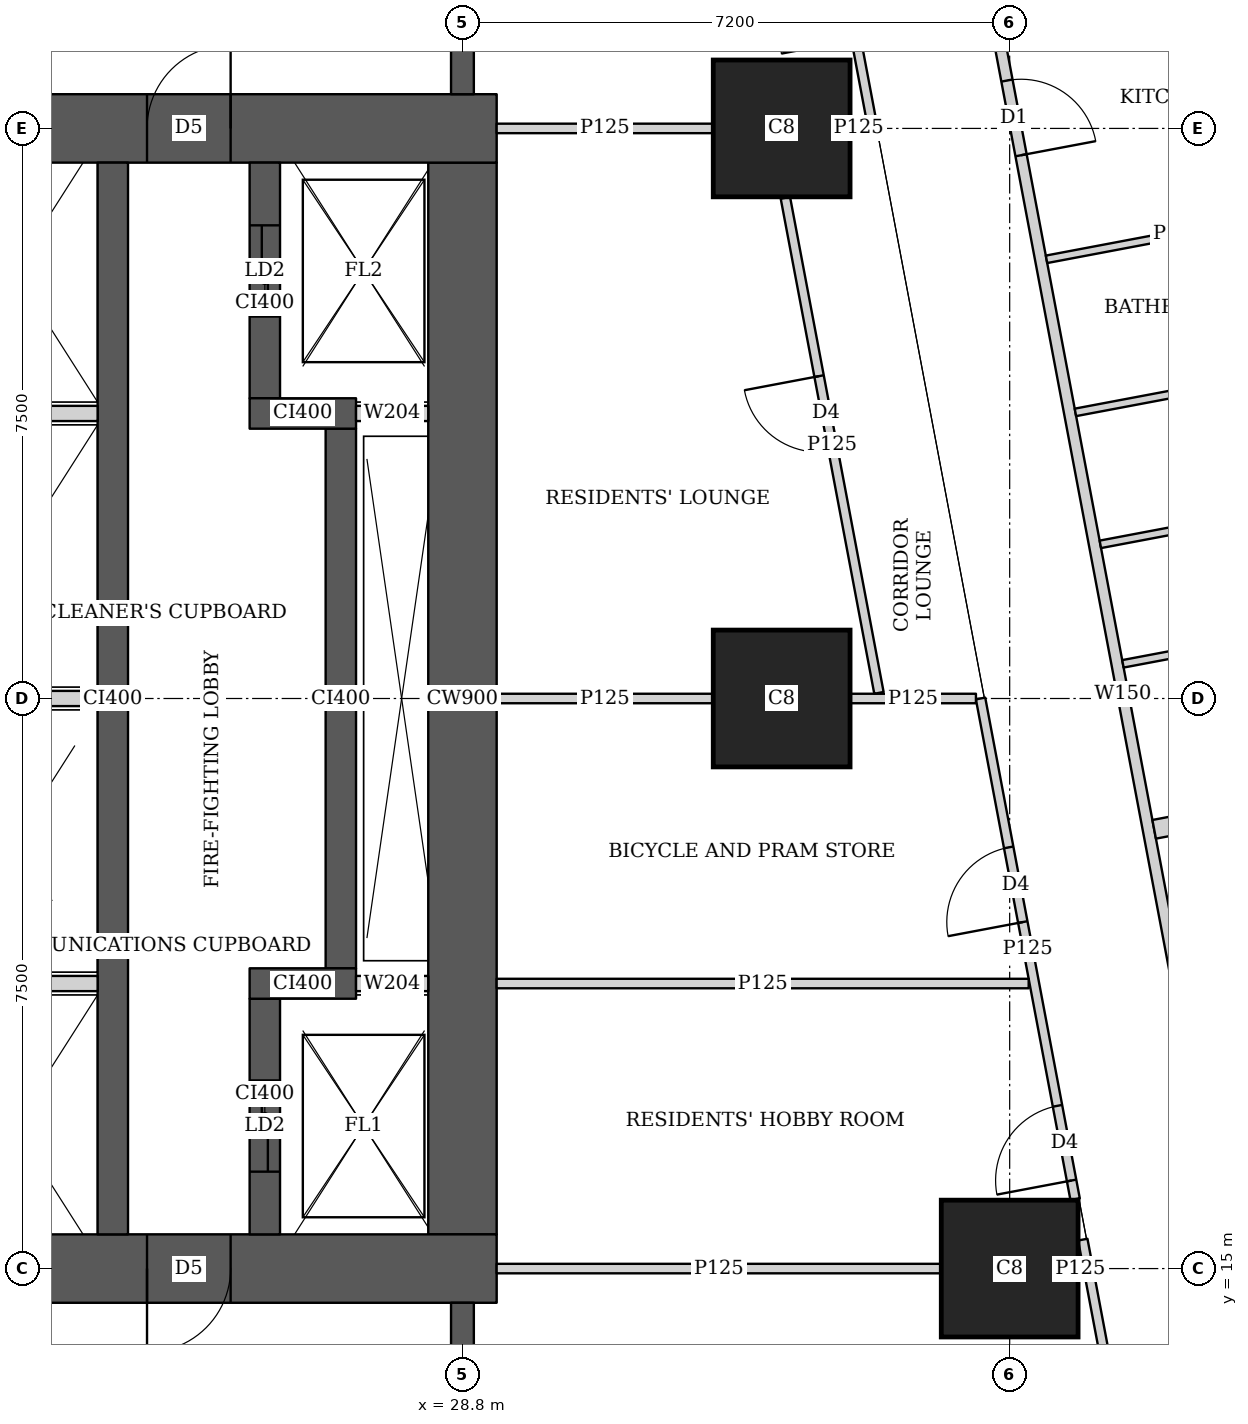
"""IFC4 building model, lengths in metres.
Left out: names, types, materials, properties, quantities, classifications, styles, units other than length and angle.
Written with IfcOpenShell. Run it as: python <this file> out.ifc"""

import sys

from ifc_helpers import new_model, si_unit, direction, frame, frame_2d, origin, origin_2d, place, context, subcontext, project, spatial, rectangle, extrude, element, fill, save


model = new_model("IFC4")
c1 = context("Model", 3, precision=1e-05, world=origin(), true_north=direction((0.0, 1.0)))
c2 = subcontext(c1, "Body", "Model", "MODEL_VIEW")
j1 = project(units=[si_unit("LENGTHUNIT", "METRE"), si_unit("PLANEANGLEUNIT", "RADIAN")], contexts=[c1])
p1 = place(None, origin())
s1 = spatial("IfcSite", under=j1, at=p1, CompositionType="ELEMENT")
p2 = place(p1, origin())
s2 = spatial("IfcBuilding", under=s1, at=p2, CompositionType="ELEMENT")
p3 = place(p2, frame((0.0, 0.0, 23.75)))
s3 = spatial("IfcBuildingStorey", under=s2, at=p3, CompositionType="ELEMENT", Elevation=23.75)
for number, where, z_axis, x_axis in (
    (1, (36.0, 15.0, 0.0), (0.0, 0.0, 1.0), (1.0, 0.0, 0.0)),
    (2, (33.0, 22.5, 0.0), (0.0, 0.0, 1.0), (1.0, 0.0, 0.0)),
    (3, (33.0, 30.0, 0.0), (0.0, 0.0, 1.0), (1.0, 0.0, 0.0)),
):
    element("IfcColumn", number, at=place(p3, frame(where, z_axis=z_axis, x_axis=x_axis)), inside=s3, PredefinedType="COLUMN", context=c2, shape_type="SweptSolid", body=[
        extrude(rectangle(XDim=1.8, YDim=1.8, at=origin_2d()), origin(), (0.0, 0.0, 1.0), 3.75),
    ])
p4 = place(p3, frame((13.95, 15.0, 0.0), z_axis=(0.0, 0.0, 1.0), x_axis=(1.0, 0.0, 0.0)))
e4 = element("IfcWall", 4, at=p4, inside=s3, PredefinedType="SHEAR", context=c2, shape_type="SweptSolid", body=[
    extrude(rectangle(XDim=15.3, YDim=0.9, at=frame_2d((7.65, 0.0))), origin(), (0.0, 0.0, 1.0), 3.75),
])
p5 = place(p4, frame((4.45, 0.0, 0.0)))
e5 = element("IfcOpeningElement", 5, at=p5, cuts=e4, PredefinedType="OPENING", context=c2, shape_type="SweptSolid", body=[
    extrude(rectangle(XDim=1.8, YDim=2.1, at=frame_2d((0.9, 1.05))), frame((0.0, 0.46, 0.0), z_axis=(0.0, -1.0, 0.0), x_axis=(1.0, 0.0, 0.0)), (0.0, 0.0, 1.0), 0.92),
])
p6 = place(p4, frame((10.7, 0.0, 0.0)))
e6 = element("IfcOpeningElement", 6, at=p6, cuts=e4, PredefinedType="OPENING", context=c2, shape_type="SweptSolid", body=[
    extrude(rectangle(XDim=1.1, YDim=2.1, at=frame_2d((0.55, 1.05))), frame((0.0, 0.46, 0.0), z_axis=(0.0, -1.0, 0.0), x_axis=(1.0, 0.0, 0.0)), (0.0, 0.0, 1.0), 0.92),
])
p7 = place(p3, frame((13.95, 30.0, 0.0), z_axis=(0.0, 0.0, 1.0), x_axis=(1.0, 0.0, 0.0)))
e7 = element("IfcWall", 7, at=p7, inside=s3, PredefinedType="SHEAR", context=c2, shape_type="SweptSolid", body=[
    extrude(rectangle(XDim=15.3, YDim=0.9, at=frame_2d((7.65, 0.0))), origin(), (0.0, 0.0, 1.0), 3.75),
])
p8 = place(p7, frame((4.45, 0.0, 0.0)))
e8 = element("IfcOpeningElement", 8, at=p8, cuts=e7, PredefinedType="OPENING", context=c2, shape_type="SweptSolid", body=[
    extrude(rectangle(XDim=1.8, YDim=2.1, at=frame_2d((0.9, 1.05))), frame((0.0, 0.46, 0.0), z_axis=(0.0, -1.0, 0.0), x_axis=(1.0, 0.0, 0.0)), (0.0, 0.0, 1.0), 0.92),
])
p9 = place(p7, frame((10.7, 0.0, 0.0)))
e9 = element("IfcOpeningElement", 9, at=p9, cuts=e7, PredefinedType="OPENING", context=c2, shape_type="SweptSolid", body=[
    extrude(rectangle(XDim=1.1, YDim=2.1, at=frame_2d((0.55, 1.05))), frame((0.0, 0.46, 0.0), z_axis=(0.0, -1.0, 0.0), x_axis=(1.0, 0.0, 0.0)), (0.0, 0.0, 1.0), 0.92),
])
p10 = place(p3, frame((28.8, 15.45, 0.0), z_axis=(0.0, 0.0, 1.0), x_axis=(0.0, 1.0, 0.0)))
e10 = element("IfcWall", 10, at=p10, inside=s3, PredefinedType="SHEAR", context=c2, shape_type="SweptSolid", body=[
    extrude(rectangle(XDim=14.1, YDim=0.9, at=frame_2d((7.05, 0.0))), origin(), (0.0, 0.0, 1.0), 3.75),
])
p11 = place(p3, frame((24.2, 15.45, 0.0), z_axis=(0.0, 0.0, 1.0), x_axis=(0.0, 1.0, 0.0)))
e11 = element("IfcWall", 11, at=p11, inside=s3, PredefinedType="SHEAR", context=c2, shape_type="SweptSolid", body=[
    extrude(rectangle(XDim=14.1, YDim=0.4, at=frame_2d((7.05, 0.0))), origin(), (0.0, 0.0, 1.0), 3.75),
])
p12 = place(p3, frame((26.2, 15.45, 0.0), z_axis=(0.0, 0.0, 1.0), x_axis=(0.0, 1.0, 0.0)))
e12 = element("IfcWall", 12, at=p12, inside=s3, PredefinedType="SHEAR", context=c2, shape_type="SweptSolid", body=[
    extrude(rectangle(XDim=3.1, YDim=0.4, at=frame_2d((1.55, 0.0))), origin(), (0.0, 0.0, 1.0), 3.75),
])
p13 = place(p12, frame((0.825, 0.0, 0.0)))
e13 = element("IfcOpeningElement", 13, at=p13, cuts=e12, PredefinedType="OPENING", context=c2, shape_type="SweptSolid", body=[
    extrude(rectangle(XDim=1.2, YDim=2.1, at=frame_2d((0.6, 1.05))), frame((0.0, 0.21, 0.0), z_axis=(0.0, -1.0, 0.0), x_axis=(1.0, 0.0, 0.0)), (0.0, 0.0, 1.0), 0.42),
])
p14 = place(p3, frame((26.0, 18.75, 0.0), z_axis=(0.0, 0.0, 1.0), x_axis=(1.0, 0.0, 0.0)))
e14 = element("IfcWall", 14, at=p14, inside=s3, PredefinedType="SHEAR", context=c2, shape_type="SweptSolid", body=[
    extrude(rectangle(XDim=1.4, YDim=0.4, at=frame_2d((0.7, 0.0))), origin(), (0.0, 0.0, 1.0), 3.75),
])
p15 = place(p3, frame((27.2, 18.95, 0.0), z_axis=(0.0, 0.0, 1.0), x_axis=(0.0, 1.0, 0.0)))
e15 = element("IfcWall", 15, at=p15, inside=s3, PredefinedType="SHEAR", context=c2, shape_type="SweptSolid", body=[
    extrude(rectangle(XDim=7.1, YDim=0.4, at=frame_2d((3.55, 0.0))), origin(), (0.0, 0.0, 1.0), 3.75),
])
p16 = place(p3, frame((26.0, 26.25, 0.0), z_axis=(0.0, 0.0, 1.0), x_axis=(1.0, 0.0, 0.0)))
e16 = element("IfcWall", 16, at=p16, inside=s3, PredefinedType="SHEAR", context=c2, shape_type="SweptSolid", body=[
    extrude(rectangle(XDim=1.4, YDim=0.4, at=frame_2d((0.7, 0.0))), origin(), (0.0, 0.0, 1.0), 3.75),
])
p17 = place(p3, frame((26.2, 26.45, 0.0), z_axis=(0.0, 0.0, 1.0), x_axis=(0.0, 1.0, 0.0)))
e17 = element("IfcWall", 17, at=p17, inside=s3, PredefinedType="SHEAR", context=c2, shape_type="SweptSolid", body=[
    extrude(rectangle(XDim=3.1, YDim=0.4, at=frame_2d((1.55, 0.0))), origin(), (0.0, 0.0, 1.0), 3.75),
])
p18 = place(p17, frame((1.075, 0.0, 0.0)))
e18 = element("IfcOpeningElement", 18, at=p18, cuts=e17, PredefinedType="OPENING", context=c2, shape_type="SweptSolid", body=[
    extrude(rectangle(XDim=1.2, YDim=2.1, at=frame_2d((0.6, 1.05))), frame((0.0, 0.21, 0.0), z_axis=(0.0, -1.0, 0.0), x_axis=(1.0, 0.0, 0.0)), (0.0, 0.0, 1.0), 0.42),
])
for number, where, z_axis, x_axis in (
    (19, (28.8, 10.35, 0.0), (0.0, 0.0, 1.0), (0.0, 1.0, 0.0)),
    (20, (28.8, 30.45, 0.0), (0.0, 0.0, 1.0), (0.0, 1.0, 0.0)),
):
    element("IfcWall", number, at=place(p3, frame(where, z_axis=z_axis, x_axis=x_axis)), inside=s3, PredefinedType="SHEAR", context=c2, shape_type="SweptSolid", body=[
        extrude(rectangle(XDim=4.2, YDim=0.3, at=frame_2d((2.1, 0.0))), origin(), (0.0, 0.0, 1.0), 3.75),
    ])
p19 = place(p3, frame((33.755, 42.325, 0.0), z_axis=(0.0, 0.0, 1.0), x_axis=(0.185611461091, -0.982623216453, 0.0)))
e21 = element("IfcWall", 21, at=p19, inside=s3, PredefinedType="SOLIDWALL", context=c2, shape_type="SweptSolid", body=[
    extrude(rectangle(XDim=40.241, YDim=0.15, at=frame_2d((20.121, 0.0))), origin(), (0.0, 0.0, 1.0), 2.5),
])
p20 = place(p19, frame((7.325, 0.0, 0.0)))
e22 = element("IfcOpeningElement", 22, at=p20, cuts=e21, PredefinedType="OPENING", context=c2, shape_type="SweptSolid", body=[
    extrude(rectangle(XDim=1.0, YDim=2.1, at=frame_2d((0.5, 1.05))), frame((0.0, 0.085, 0.0), z_axis=(0.0, -1.0, 0.0), x_axis=(1.0, 0.0, 0.0)), (0.0, 0.0, 1.0), 0.17),
])
p21 = place(p19, frame((11.902, 0.0, 0.0)))
e23 = element("IfcOpeningElement", 23, at=p21, cuts=e21, PredefinedType="OPENING", context=c2, shape_type="SweptSolid", body=[
    extrude(rectangle(XDim=1.0, YDim=2.1, at=frame_2d((0.5, 1.05))), frame((0.0, 0.085, 0.0), z_axis=(0.0, -1.0, 0.0), x_axis=(1.0, 0.0, 0.0)), (0.0, 0.0, 1.0), 0.17),
])
p22 = place(p19, frame((25.718, 0.0, 0.0)))
e24 = element("IfcOpeningElement", 24, at=p22, cuts=e21, PredefinedType="OPENING", context=c2, shape_type="SweptSolid", body=[
    extrude(rectangle(XDim=1.0, YDim=2.1, at=frame_2d((0.5, 1.05))), frame((0.0, 0.085, 0.0), z_axis=(0.0, -1.0, 0.0), x_axis=(1.0, 0.0, 0.0)), (0.0, 0.0, 1.0), 0.17),
])
p23 = place(p19, frame((31.788, 0.0, 0.0)))
e25 = element("IfcOpeningElement", 25, at=p23, cuts=e21, PredefinedType="OPENING", context=c2, shape_type="SweptSolid", body=[
    extrude(rectangle(XDim=1.0, YDim=2.1, at=frame_2d((0.5, 1.05))), frame((0.0, 0.085, 0.0), z_axis=(0.0, -1.0, 0.0), x_axis=(1.0, 0.0, 0.0)), (0.0, 0.0, 1.0), 0.17),
])
for number, where, z_axis, x_axis in (
    (26, (39.948, 28.933, 0.0), (0.0, 0.0, 1.0), (-0.983, -0.186, 0.0)),
    (27, (40.656, 25.183, 0.0), (0.0, 0.0, 1.0), (-0.983, -0.186, 0.0)),
):
    element("IfcWall", number, at=place(p3, frame(where, z_axis=z_axis, x_axis=x_axis)), inside=s3, PredefinedType="PARTITIONING", context=c2, shape_type="SweptSolid", body=[
        extrude(rectangle(XDim=3.524, YDim=0.1, at=frame_2d((1.762, 0.0))), origin(), (0.0, 0.0, 1.0), 3.5),
    ])
p24 = place(p3, frame((40.329, 26.918, 0.0), z_axis=(0.0, 0.0, 1.0), x_axis=(-0.982638553676, -0.185530247748, 0.0)))
e28 = element("IfcWall", 28, at=p24, inside=s3, PredefinedType="PARTITIONING", context=c2, shape_type="SweptSolid", body=[
    extrude(rectangle(XDim=3.525, YDim=0.1, at=frame_2d((1.763, 0.0))), origin(), (0.0, 0.0, 1.0), 3.5),
])
p25 = place(p3, frame((40.954, 23.61, 0.0), z_axis=(0.0, 0.0, 1.0), x_axis=(-0.982638553676, -0.185530247748, 0.0)))
e29 = element("IfcWall", 29, at=p25, inside=s3, PredefinedType="PARTITIONING", context=c2, shape_type="SweptSolid", body=[
    extrude(rectangle(XDim=3.525, YDim=0.1, at=frame_2d((1.763, 0.0))), origin(), (0.0, 0.0, 1.0), 2.5),
])
p26 = place(p3, frame((42.593, 21.665, 0.0), z_axis=(0.0, 0.0, 1.0), x_axis=(-0.982635807605, -0.185544791394, 0.0)))
e30 = element("IfcWall", 30, at=p26, inside=s3, PredefinedType="SOLIDWALL", context=c2, shape_type="SweptSolid", body=[
    extrude(rectangle(XDim=4.775, YDim=0.25, at=frame_2d((2.388, 0.0))), origin(), (0.0, 0.0, 1.0), 2.5),
])
p27 = place(p3, frame((37.9, 10.413, 0.0), z_axis=(0.0, 0.0, 1.0), x_axis=(-0.185527510388, 0.982639070508, 0.0)))
e31 = element("IfcWall", 31, at=p27, inside=s3, PredefinedType="PARTITIONING", context=c2, shape_type="SweptSolid", body=[
    extrude(rectangle(XDim=5.056, YDim=0.125, at=frame_2d((2.528, 0.0))), origin(), (0.0, 0.0, 1.0), 3.5),
])
p28 = place(p27, frame((0.708, 0.0, 0.0)))
e32 = element("IfcOpeningElement", 32, at=p28, cuts=e31, PredefinedType="OPENING", context=c2, shape_type="SweptSolid", body=[
    extrude(rectangle(XDim=1.0, YDim=2.1, at=frame_2d((0.5, 1.05))), frame((0.0, 0.073, 0.0), z_axis=(0.0, -1.0, 0.0), x_axis=(1.0, 0.0, 0.0)), (0.0, 0.0, 1.0), 0.145),
])
p29 = place(p3, frame((36.861, 15.913, 0.0), z_axis=(0.0, 0.0, 1.0), x_axis=(-0.185598960122, 0.982625577726, 0.0)))
e33 = element("IfcWall", 33, at=p29, inside=s3, PredefinedType="PARTITIONING", context=c2, shape_type="SweptSolid", body=[
    extrude(rectangle(XDim=6.703, YDim=0.125, at=frame_2d((3.352, 0.0))), origin(), (0.0, 0.0, 1.0), 2.5),
])
p30 = place(p29, frame((0.25, 0.0, 0.0)))
e34 = element("IfcOpeningElement", 34, at=p30, cuts=e33, PredefinedType="OPENING", context=c2, shape_type="SweptSolid", body=[
    extrude(rectangle(XDim=1.0, YDim=2.1, at=frame_2d((0.5, 1.05))), frame((0.0, 0.073, 0.0), z_axis=(0.0, -1.0, 0.0), x_axis=(1.0, 0.0, 0.0)), (0.0, 0.0, 1.0), 0.145),
])
p31 = place(p29, frame((3.71, 0.0, 0.0)))
e35 = element("IfcOpeningElement", 35, at=p31, cuts=e33, PredefinedType="OPENING", context=c2, shape_type="SweptSolid", body=[
    extrude(rectangle(XDim=1.0, YDim=2.1, at=frame_2d((0.5, 1.05))), frame((0.0, 0.073, 0.0), z_axis=(0.0, -1.0, 0.0), x_axis=(1.0, 0.0, 0.0)), (0.0, 0.0, 1.0), 0.145),
])
p32 = place(p3, frame((34.193, 30.04, 0.0), z_axis=(0.0, 0.0, 1.0), x_axis=(-0.185626015863, 0.982620467034, 0.0)))
e36 = element("IfcWall", 36, at=p32, inside=s3, PredefinedType="PARTITIONING", context=c2, shape_type="SweptSolid", body=[
    extrude(rectangle(XDim=4.628, YDim=0.125, at=frame_2d((2.314, 0.0))), origin(), (0.0, 0.0, 1.0), 2.5),
])
p33 = place(p32, frame((1.15, 0.0, 0.0)))
e37 = element("IfcOpeningElement", 37, at=p33, cuts=e36, PredefinedType="OPENING", context=c2, shape_type="SweptSolid", body=[
    extrude(rectangle(XDim=1.0, YDim=2.1, at=frame_2d((0.5, 1.05))), frame((0.0, 0.073, 0.0), z_axis=(0.0, -1.0, 0.0), x_axis=(1.0, 0.0, 0.0)), (0.0, 0.0, 1.0), 0.145),
])
p34 = place(p3, frame((34.28, 22.574, 0.0), z_axis=(0.0, 0.0, 1.0), x_axis=(-0.185713862218, 0.982603867986, 0.0)))
e38 = element("IfcWall", 38, at=p34, inside=s3, PredefinedType="PARTITIONING", context=c2, shape_type="SweptSolid", body=[
    extrude(rectangle(XDim=6.628, YDim=0.125, at=frame_2d((3.314, 0.0))), origin(), (0.0, 0.0, 1.0), 2.5),
])
p35 = place(p34, frame((3.241, 0.0, 0.0)))
e39 = element("IfcOpeningElement", 39, at=p35, cuts=e38, PredefinedType="OPENING", context=c2, shape_type="SweptSolid", body=[
    extrude(rectangle(XDim=1.0, YDim=2.1, at=frame_2d((0.5, 1.05))), frame((0.0, 0.073, 0.0), z_axis=(0.0, -1.0, 0.0), x_axis=(1.0, 0.0, 0.0)), (0.0, 0.0, 1.0), 0.145),
])
p36 = place(p3, frame((29.25, 15.0, 0.0), z_axis=(0.0, 0.0, 1.0), x_axis=(1.0, 0.0, 0.0)))
e40 = element("IfcWall", 40, at=p36, inside=s3, PredefinedType="PARTITIONING", context=c2, shape_type="SweptSolid", body=[
    extrude(rectangle(XDim=5.849, YDim=0.125, at=frame_2d((2.925, 0.0))), origin(), (0.0, 0.0, 1.0), 3.5),
])
p37 = place(p3, frame((36.901, 15.0, 0.0), z_axis=(0.0, 0.0, 1.0), x_axis=(1.0, 0.0, 0.0)))
e41 = element("IfcWall", 41, at=p37, inside=s3, PredefinedType="PARTITIONING", context=c2, shape_type="SweptSolid", body=[
    extrude(rectangle(XDim=0.057, YDim=0.125, at=frame_2d((0.029, 0.0))), origin(), (0.0, 0.0, 1.0), 3.5),
])
p38 = place(p3, frame((29.25, 18.75, 0.0), z_axis=(0.0, 0.0, 1.0), x_axis=(1.0, 0.0, 0.0)))
e42 = element("IfcWall", 42, at=p38, inside=s3, PredefinedType="PARTITIONING", context=c2, shape_type="SweptSolid", body=[
    extrude(rectangle(XDim=7.0, YDim=0.125, at=frame_2d((3.5, 0.0))), origin(), (0.0, 0.0, 1.0), 3.5),
])
p39 = place(p3, frame((29.25, 22.5, 0.0), z_axis=(0.0, 0.0, 1.0), x_axis=(1.0, 0.0, 0.0)))
e43 = element("IfcWall", 43, at=p39, inside=s3, PredefinedType="PARTITIONING", context=c2, shape_type="SweptSolid", body=[
    extrude(rectangle(XDim=2.849, YDim=0.125, at=frame_2d((1.425, 0.0))), origin(), (0.0, 0.0, 1.0), 3.5),
])
p40 = place(p3, frame((33.901, 22.5, 0.0), z_axis=(0.0, 0.0, 1.0), x_axis=(1.0, 0.0, 0.0)))
e44 = element("IfcWall", 44, at=p40, inside=s3, PredefinedType="PARTITIONING", context=c2, shape_type="SweptSolid", body=[
    extrude(rectangle(XDim=1.655, YDim=0.125, at=frame_2d((0.828, 0.0))), origin(), (0.0, 0.0, 1.0), 2.5),
])
p41 = place(p3, frame((29.25, 30.0, 0.0), z_axis=(0.0, 0.0, 1.0), x_axis=(1.0, 0.0, 0.0)))
e45 = element("IfcWall", 45, at=p41, inside=s3, PredefinedType="PARTITIONING", context=c2, shape_type="SweptSolid", body=[
    extrude(rectangle(XDim=2.849, YDim=0.125, at=frame_2d((1.425, 0.0))), origin(), (0.0, 0.0, 1.0), 3.5),
])
p42 = place(p3, frame((33.901, 30.0, 0.0), z_axis=(0.0, 0.0, 1.0), x_axis=(1.0, 0.0, 0.0)))
e46 = element("IfcWall", 46, at=p42, inside=s3, PredefinedType="PARTITIONING", context=c2, shape_type="SweptSolid", body=[
    extrude(rectangle(XDim=0.224, YDim=0.125, at=frame_2d((0.112, 0.0))), origin(), (0.0, 0.0, 1.0), 2.5),
])
for number, where, z_axis, x_axis in (
    (47, (21.8, 18.75, 0.0), (0.0, 0.0, 1.0), (1.0, 0.0, 0.0)),
    (48, (21.8, 22.5, 0.0), (0.0, 0.0, 1.0), (1.0, 0.0, 0.0)),
    (49, (21.8, 26.25, 0.0), (0.0, 0.0, 1.0), (1.0, 0.0, 0.0)),
):
    element("IfcWall", number, at=place(p3, frame(where, z_axis=z_axis, x_axis=x_axis)), inside=s3, PredefinedType="SOLIDWALL", context=c2, shape_type="SweptSolid", body=[
        extrude(rectangle(XDim=2.2, YDim=0.2, at=frame_2d((1.1, 0.0))), origin(), (0.0, 0.0, 1.0), 3.5),
    ])
for number, where, z_axis, x_axis in (
    (50, (27.4, 18.75, 0.0), (0.0, 0.0, 1.0), (1.0, 0.0, 0.0)),
    (51, (27.4, 26.25, 0.0), (0.0, 0.0, 1.0), (1.0, 0.0, 0.0)),
):
    element("IfcWall", number, at=place(p3, frame(where, z_axis=z_axis, x_axis=x_axis)), inside=s3, PredefinedType="SOLIDWALL", context=c2, shape_type="SweptSolid", body=[
        extrude(rectangle(XDim=0.95, YDim=0.2, at=frame_2d((0.475, 0.0))), origin(), (0.0, 0.0, 1.0), 3.5),
    ])
p43 = place(p21, origin())
e52 = element("IfcDoor", 52, at=p43, inside=s3, OperationType="SINGLE_SWING_RIGHT", PredefinedType="DOOR", context=c2, shape_type="SweptSolid", body=[
    extrude(rectangle(XDim=1.0, YDim=2.1, at=frame_2d((0.5, 1.05))), frame((0.0, 0.025, 0.0), z_axis=(0.0, -1.0, 0.0), x_axis=(1.0, 0.0, 0.0)), (0.0, 0.0, 1.0), 0.05),
])
fill(e23, e52)
p44 = place(p30, origin())
e53 = element("IfcDoor", 53, at=p44, inside=s3, OperationType="SINGLE_SWING_LEFT", PredefinedType="DOOR", context=c2, shape_type="SweptSolid", body=[
    extrude(rectangle(XDim=1.0, YDim=2.1, at=frame_2d((0.5, 1.05))), frame((0.0, 0.025, 0.0), z_axis=(0.0, -1.0, 0.0), x_axis=(1.0, 0.0, 0.0)), (0.0, 0.0, 1.0), 0.05),
])
fill(e34, e53)
p45 = place(p31, origin())
e54 = element("IfcDoor", 54, at=p45, inside=s3, OperationType="SINGLE_SWING_LEFT", PredefinedType="DOOR", context=c2, shape_type="SweptSolid", body=[
    extrude(rectangle(XDim=1.0, YDim=2.1, at=frame_2d((0.5, 1.05))), frame((0.0, 0.025, 0.0), z_axis=(0.0, -1.0, 0.0), x_axis=(1.0, 0.0, 0.0)), (0.0, 0.0, 1.0), 0.05),
])
fill(e35, e54)
p46 = place(p35, origin())
e55 = element("IfcDoor", 55, at=p46, inside=s3, OperationType="SINGLE_SWING_RIGHT", PredefinedType="DOOR", context=c2, shape_type="SweptSolid", body=[
    extrude(rectangle(XDim=1.0, YDim=2.1, at=frame_2d((0.5, 1.05))), frame((0.0, 0.025, 0.0), z_axis=(0.0, -1.0, 0.0), x_axis=(1.0, 0.0, 0.0)), (0.0, 0.0, 1.0), 0.05),
])
fill(e39, e55)
p47 = place(p6, origin())
e56 = element("IfcDoor", 56, at=p47, inside=s3, OperationType="SINGLE_SWING_RIGHT", PredefinedType="DOOR", context=c2, shape_type="SweptSolid", body=[
    extrude(rectangle(XDim=1.1, YDim=2.1, at=frame_2d((0.55, 1.05))), frame((0.0, 0.025, 0.0), z_axis=(0.0, -1.0, 0.0), x_axis=(1.0, 0.0, 0.0)), (0.0, 0.0, 1.0), 0.05),
])
fill(e6, e56)
p48 = place(p9, origin())
e57 = element("IfcDoor", 57, at=p48, inside=s3, OperationType="SINGLE_SWING_RIGHT", PredefinedType="DOOR", context=c2, shape_type="SweptSolid", body=[
    extrude(rectangle(XDim=1.1, YDim=2.1, at=frame_2d((0.55, 1.05))), frame((0.0, 0.025, 0.0), z_axis=(0.0, -1.0, 0.0), x_axis=(1.0, 0.0, 0.0)), (0.0, 0.0, 1.0), 0.05),
])
fill(e9, e57)
p49 = place(p13, origin())
e58 = element("IfcDoor", 58, at=p49, inside=s3, OperationType="DOUBLE_DOOR_SLIDING", PredefinedType="DOOR", context=c2, shape_type="SweptSolid", body=[
    extrude(rectangle(XDim=1.2, YDim=2.1, at=frame_2d((0.6, 1.05))), frame((0.0, 0.025, 0.0), z_axis=(0.0, -1.0, 0.0), x_axis=(1.0, 0.0, 0.0)), (0.0, 0.0, 1.0), 0.05),
])
fill(e13, e58)
p50 = place(p18, origin())
e59 = element("IfcDoor", 59, at=p50, inside=s3, OperationType="DOUBLE_DOOR_SLIDING", PredefinedType="DOOR", context=c2, shape_type="SweptSolid", body=[
    extrude(rectangle(XDim=1.2, YDim=2.1, at=frame_2d((0.6, 1.05))), frame((0.0, 0.025, 0.0), z_axis=(0.0, -1.0, 0.0), x_axis=(1.0, 0.0, 0.0)), (0.0, 0.0, 1.0), 0.05),
])
fill(e18, e59)
save(model, sys.argv[1])
